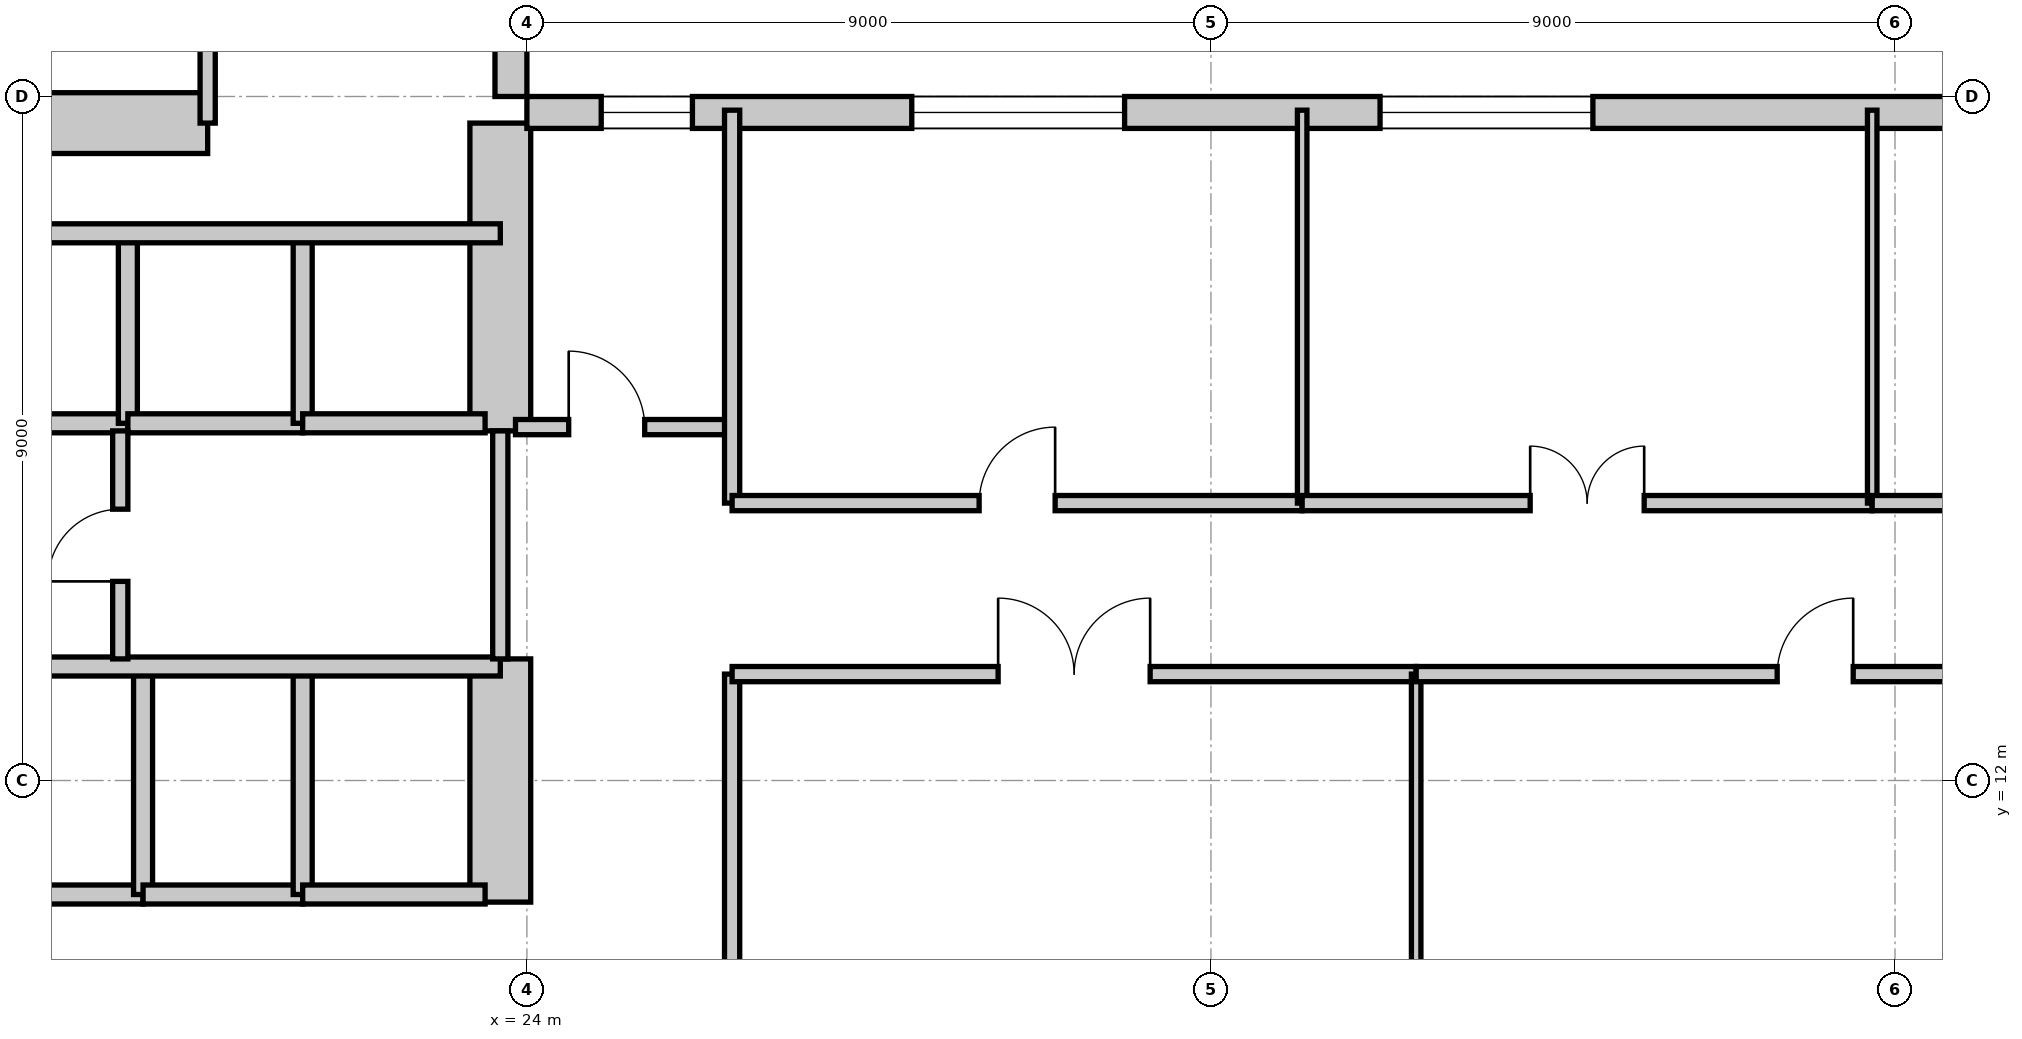
"""IFC4 building model, lengths in metres.
Left out: names, types, materials, properties, quantities, classifications, styles, units other than length and angle.
Written with IfcOpenShell. Run it as: python <this file> out.ifc"""

import sys

from ifc_helpers import new_model, si_unit, direction, frame, frame_2d, origin, origin_2d, place, context, subcontext, project, spatial, rectangle, extrude, element, fill, save


model = new_model("IFC4")
c1 = context("Model", 3, precision=1e-05, world=origin(), true_north=direction((0.0, 1.0)))
c2 = subcontext(c1, "Body", "Model", "MODEL_VIEW")
j1 = project(units=[si_unit("LENGTHUNIT", "METRE"), si_unit("PLANEANGLEUNIT", "RADIAN")], contexts=[c1])
p1 = place(None, origin())
s1 = spatial("IfcSite", under=j1, at=p1, CompositionType="ELEMENT")
p2 = place(p1, origin())
s2 = spatial("IfcBuilding", under=s1, at=p2, CompositionType="ELEMENT")
p3 = place(p2, frame((0.0, 0.0, 38.4)))
s3 = spatial("IfcBuildingStorey", under=s2, at=p3, CompositionType="ELEMENT", Elevation=38.4)
p4 = place(p3, frame((7.475, 20.65, 0.0), z_axis=(0.0, 0.0, 1.0), x_axis=(1.0, 0.0, 0.0)))
e1 = element("IfcWall", 1, at=p4, inside=s3, PredefinedType="SHEAR", context=c2, shape_type="SweptSolid", body=[
    extrude(rectangle(XDim=12.325, YDim=0.8, at=frame_2d((6.163, 0.0))), origin(), (0.0, 0.0, 1.0), 4.2),
])
p5 = place(p3, frame((23.65, 10.4, 0.0), z_axis=(0.0, 0.0, 1.0), x_axis=(0.0, 1.0, 0.0)))
e2 = element("IfcWall", 2, at=p5, inside=s3, PredefinedType="SHEAR", context=c2, shape_type="SweptSolid", body=[
    extrude(rectangle(XDim=3.2, YDim=0.8, at=frame_2d((1.6, 0.0))), origin(), (0.0, 0.0, 1.0), 4.2),
])
p6 = place(p3, frame((23.65, 16.6, 0.0), z_axis=(0.0, 0.0, 1.0), x_axis=(0.0, 1.0, 0.0)))
e3 = element("IfcWall", 3, at=p6, inside=s3, PredefinedType="SHEAR", context=c2, shape_type="SweptSolid", body=[
    extrude(rectangle(XDim=4.05, YDim=0.8, at=frame_2d((2.025, 0.0))), origin(), (0.0, 0.0, 1.0), 4.2),
])
for number, where, z_axis, x_axis in (
    (4, (24.0, 21.0, 0.0), (0.0, 0.0, 1.0), (1.0, 0.0, 0.0)),
    (5, (33.0, 21.0, 0.0), (0.0, 0.0, 1.0), (1.0, 0.0, 0.0)),
    (6, (42.0, 21.0, 0.0), (0.0, 0.0, 1.0), (1.0, 0.0, 0.0)),
):
    element("IfcColumn", number, at=place(p3, frame(where, z_axis=z_axis, x_axis=x_axis)), inside=s3, PredefinedType="COLUMN", context=c2, shape_type="SweptSolid", body=[
        extrude(rectangle(XDim=1.2, YDim=1.2, at=origin_2d()), origin(), (0.0, 0.0, 1.0), 4.2),
    ])
p7 = place(p3, frame((64.4, 20.79, 0.0), z_axis=(0.0, 0.0, 1.0), x_axis=(-1.0, 0.0, 0.0)))
e7 = element("IfcWall", 7, at=p7, inside=s3, PredefinedType="STANDARD", context=c2, shape_type="SweptSolid", body=[
    extrude(rectangle(XDim=40.4, YDim=0.42, at=frame_2d((20.2, 0.0))), origin(), (0.0, 0.0, 1.0), 3.98),
])
p8 = place(p7, frame((26.375, 0.0, 0.85)))
e8 = element("IfcOpeningElement", 8, at=p8, cuts=e7, PredefinedType="OPENING", context=c2, shape_type="SweptSolid", body=[
    extrude(rectangle(XDim=2.8, YDim=2.45, at=frame_2d((1.4, 1.225))), frame((0.0, 0.22, 0.0), z_axis=(0.0, -1.0, 0.0), x_axis=(1.0, 0.0, 0.0)), (0.0, 0.0, 1.0), 0.44),
])
p9 = place(p7, frame((38.222, 0.0, 0.85)))
e9 = element("IfcOpeningElement", 9, at=p9, cuts=e7, PredefinedType="OPENING", context=c2, shape_type="SweptSolid", body=[
    extrude(rectangle(XDim=1.2, YDim=2.45, at=frame_2d((0.6, 1.225))), frame((0.0, 0.22, 0.0), z_axis=(0.0, -1.0, 0.0), x_axis=(1.0, 0.0, 0.0)), (0.0, 0.0, 1.0), 0.44),
])
p10 = place(p7, frame((32.536, 0.0, 0.85)))
e10 = element("IfcOpeningElement", 10, at=p10, cuts=e7, PredefinedType="OPENING", context=c2, shape_type="SweptSolid", body=[
    extrude(rectangle(XDim=2.8, YDim=2.45, at=frame_2d((1.4, 1.225))), frame((0.0, 0.22, 0.0), z_axis=(0.0, -1.0, 0.0), x_axis=(1.0, 0.0, 0.0)), (0.0, 0.0, 1.0), 0.44),
])
p11 = place(p7, frame((17.386, 0.0, 0.85)))
e11 = element("IfcOpeningElement", 11, at=p11, cuts=e7, PredefinedType="OPENING", context=c2, shape_type="SweptSolid", body=[
    extrude(rectangle(XDim=2.8, YDim=2.45, at=frame_2d((1.4, 1.225))), frame((0.0, 0.22, 0.0), z_axis=(0.0, -1.0, 0.0), x_axis=(1.0, 0.0, 0.0)), (0.0, 0.0, 1.0), 0.44),
])
p12 = place(p3, frame((23.79, 21.0, 0.0), z_axis=(0.0, 0.0, 1.0), x_axis=(0.0, 1.0, 0.0)))
e12 = element("IfcWall", 12, at=p12, inside=s3, PredefinedType="STANDARD", context=c2, shape_type="SweptSolid", body=[
    extrude(rectangle(XDim=28.4, YDim=0.42, at=frame_2d((14.2, 0.0))), origin(), (0.0, 0.0, 1.0), 3.98),
])
p13 = place(p12, frame((10.433, 0.0, 0.85)))
e13 = element("IfcOpeningElement", 13, at=p13, cuts=e12, PredefinedType="OPENING", context=c2, shape_type="SweptSolid", body=[
    extrude(rectangle(XDim=2.8, YDim=2.45, at=frame_2d((1.4, 1.225))), frame((0.0, 0.22, 0.0), z_axis=(0.0, -1.0, 0.0), x_axis=(1.0, 0.0, 0.0)), (0.0, 0.0, 1.0), 0.44),
])
p14 = place(p12, frame((16.016, 0.0, 0.85)))
e14 = element("IfcOpeningElement", 14, at=p14, cuts=e12, PredefinedType="OPENING", context=c2, shape_type="SweptSolid", body=[
    extrude(rectangle(XDim=1.2, YDim=2.45, at=frame_2d((0.6, 1.225))), frame((0.0, 0.22, 0.0), z_axis=(0.0, -1.0, 0.0), x_axis=(1.0, 0.0, 0.0)), (0.0, 0.0, 1.0), 0.44),
])
p15 = place(p3, frame((16.45, 16.7, 0.0), z_axis=(0.0, 0.0, 1.0), x_axis=(1.0, 0.0, 0.0)))
e15 = element("IfcWall", 15, at=p15, inside=s3, PredefinedType="PARTITIONING", context=c2, shape_type="SweptSolid", body=[
    extrude(rectangle(XDim=2.3, YDim=0.25, at=frame_2d((1.15, 0.0))), origin(), (0.0, 0.0, 1.0), 3.426),
])
p16 = place(p3, frame((18.75, 16.7, 0.0), z_axis=(0.0, 0.0, 1.0), x_axis=(0.0, 1.0, 0.0)))
e16 = element("IfcWall", 16, at=p16, inside=s3, PredefinedType="PARTITIONING", context=c2, shape_type="SweptSolid", body=[
    extrude(rectangle(XDim=2.5, YDim=0.25, at=frame_2d((1.25, 0.0))), origin(), (0.0, 0.0, 1.0), 3.97),
])
p17 = place(p3, frame((18.75, 16.7, 0.0), z_axis=(0.0, 0.0, 1.0), x_axis=(1.0, 0.0, 0.0)))
e17 = element("IfcWall", 17, at=p17, inside=s3, PredefinedType="PARTITIONING", context=c2, shape_type="SweptSolid", body=[
    extrude(rectangle(XDim=2.3, YDim=0.25, at=frame_2d((1.15, 0.0))), origin(), (0.0, 0.0, 1.0), 3.426),
])
p18 = place(p3, frame((21.05, 16.7, 0.0), z_axis=(0.0, 0.0, 1.0), x_axis=(0.0, 1.0, 0.0)))
e18 = element("IfcWall", 18, at=p18, inside=s3, PredefinedType="PARTITIONING", context=c2, shape_type="SweptSolid", body=[
    extrude(rectangle(XDim=2.5, YDim=0.25, at=frame_2d((1.25, 0.0))), origin(), (0.0, 0.0, 1.0), 3.97),
])
p19 = place(p3, frame((21.05, 16.7, 0.0), z_axis=(0.0, 0.0, 1.0), x_axis=(1.0, 0.0, 0.0)))
e19 = element("IfcWall", 19, at=p19, inside=s3, PredefinedType="PARTITIONING", context=c2, shape_type="SweptSolid", body=[
    extrude(rectangle(XDim=2.4, YDim=0.25, at=frame_2d((1.2, 0.0))), origin(), (0.0, 0.0, 1.0), 3.426),
])
p20 = place(p3, frame((16.45, 19.2, 0.0), z_axis=(0.0, 0.0, 1.0), x_axis=(1.0, 0.0, 0.0)))
e20 = element("IfcWall", 20, at=p20, inside=s3, PredefinedType="PARTITIONING", context=c2, shape_type="SweptSolid", body=[
    extrude(rectangle(XDim=7.2, YDim=0.25, at=frame_2d((3.6, 0.0))), origin(), (0.0, 0.0, 1.0), 3.97),
])
p21 = place(p3, frame((16.85, 10.5, 0.0), z_axis=(0.0, 0.0, 1.0), x_axis=(1.0, 0.0, 0.0)))
e21 = element("IfcWall", 21, at=p21, inside=s3, PredefinedType="PARTITIONING", context=c2, shape_type="SweptSolid", body=[
    extrude(rectangle(XDim=2.1, YDim=0.25, at=frame_2d((1.05, 0.0))), origin(), (0.0, 0.0, 1.0), 3.426),
])
p22 = place(p3, frame((18.95, 10.5, 0.0), z_axis=(0.0, 0.0, 1.0), x_axis=(0.0, 1.0, 0.0)))
e22 = element("IfcWall", 22, at=p22, inside=s3, PredefinedType="PARTITIONING", context=c2, shape_type="SweptSolid", body=[
    extrude(rectangle(XDim=3.0, YDim=0.25, at=frame_2d((1.5, 0.0))), origin(), (0.0, 0.0, 1.0), 3.97),
])
p23 = place(p3, frame((18.95, 10.5, 0.0), z_axis=(0.0, 0.0, 1.0), x_axis=(1.0, 0.0, 0.0)))
e23 = element("IfcWall", 23, at=p23, inside=s3, PredefinedType="PARTITIONING", context=c2, shape_type="SweptSolid", body=[
    extrude(rectangle(XDim=2.1, YDim=0.25, at=frame_2d((1.05, 0.0))), origin(), (0.0, 0.0, 1.0), 3.426),
])
p24 = place(p3, frame((21.05, 10.5, 0.0), z_axis=(0.0, 0.0, 1.0), x_axis=(0.0, 1.0, 0.0)))
e24 = element("IfcWall", 24, at=p24, inside=s3, PredefinedType="PARTITIONING", context=c2, shape_type="SweptSolid", body=[
    extrude(rectangle(XDim=3.0, YDim=0.25, at=frame_2d((1.5, 0.0))), origin(), (0.0, 0.0, 1.0), 3.97),
])
p25 = place(p3, frame((21.05, 10.5, 0.0), z_axis=(0.0, 0.0, 1.0), x_axis=(1.0, 0.0, 0.0)))
e25 = element("IfcWall", 25, at=p25, inside=s3, PredefinedType="PARTITIONING", context=c2, shape_type="SweptSolid", body=[
    extrude(rectangle(XDim=2.4, YDim=0.25, at=frame_2d((1.2, 0.0))), origin(), (0.0, 0.0, 1.0), 3.426),
])
p26 = place(p3, frame((14.7, 13.5, 0.0), z_axis=(0.0, 0.0, 1.0), x_axis=(1.0, 0.0, 0.0)))
e26 = element("IfcWall", 26, at=p26, inside=s3, PredefinedType="PARTITIONING", context=c2, shape_type="SweptSolid", body=[
    extrude(rectangle(XDim=8.95, YDim=0.25, at=frame_2d((4.475, 0.0))), origin(), (0.0, 0.0, 1.0), 3.426),
])
p27 = place(p3, frame((18.65, 13.6, 0.0), z_axis=(0.0, 0.0, 1.0), x_axis=(0.0, 1.0, 0.0)))
e27 = element("IfcWall", 27, at=p27, inside=s3, PredefinedType="PARTITIONING", context=c2, shape_type="SweptSolid", body=[
    extrude(rectangle(XDim=3.0, YDim=0.2, at=frame_2d((1.5, 0.0))), origin(), (0.0, 0.0, 1.0), 3.97),
])
p28 = place(p27, frame((1.02, 0.0, 0.0)))
e28 = element("IfcOpeningElement", 28, at=p28, cuts=e27, PredefinedType="OPENING", context=c2, shape_type="SweptSolid", body=[
    extrude(rectangle(XDim=0.95, YDim=2.1, at=frame_2d((0.475, 1.05))), frame((0.0, 0.11, 0.0), z_axis=(0.0, -1.0, 0.0), x_axis=(1.0, 0.0, 0.0)), (0.0, 0.0, 1.0), 0.22),
])
p29 = place(p3, frame((23.65, 13.6, 0.0), z_axis=(0.0, 0.0, 1.0), x_axis=(0.0, 1.0, 0.0)))
e29 = element("IfcWall", 29, at=p29, inside=s3, PredefinedType="PARTITIONING", context=c2, shape_type="SweptSolid", body=[
    extrude(rectangle(XDim=3.0, YDim=0.2, at=frame_2d((1.5, 0.0))), origin(), (0.0, 0.0, 1.0), 3.97),
])
p30 = place(p3, frame((23.85, 16.65, 0.0), z_axis=(0.0, 0.0, 1.0), x_axis=(1.0, 0.0, 0.0)))
e30 = element("IfcWall", 30, at=p30, inside=s3, PredefinedType="PARTITIONING", context=c2, shape_type="SweptSolid", body=[
    extrude(rectangle(XDim=2.85, YDim=0.2, at=frame_2d((1.425, 0.0))), origin(), (0.0, 0.0, 1.0), 3.97),
])
p31 = place(p30, frame((0.7, 0.0, 0.0)))
e31 = element("IfcOpeningElement", 31, at=p31, cuts=e30, PredefinedType="OPENING", context=c2, shape_type="SweptSolid", body=[
    extrude(rectangle(XDim=1.0, YDim=2.15, at=frame_2d((0.5, 1.075))), frame((0.0, 0.11, 0.0), z_axis=(0.0, -1.0, 0.0), x_axis=(1.0, 0.0, 0.0)), (0.0, 0.0, 1.0), 0.22),
])
p32 = place(p3, frame((26.7, 3.18, 0.0), z_axis=(0.0, 0.0, 1.0), x_axis=(0.0, 1.0, 0.0)))
e32 = element("IfcWall", 32, at=p32, inside=s3, PredefinedType="PARTITIONING", context=c2, shape_type="SweptSolid", body=[
    extrude(rectangle(XDim=10.22, YDim=0.2, at=frame_2d((5.11, 0.0))), origin(), (0.0, 0.0, 1.0), 3.97),
])
p33 = place(p3, frame((26.7, 15.65, 0.0), z_axis=(0.0, 0.0, 1.0), x_axis=(0.0, 1.0, 0.0)))
e33 = element("IfcWall", 33, at=p33, inside=s3, PredefinedType="PARTITIONING", context=c2, shape_type="SweptSolid", body=[
    extrude(rectangle(XDim=5.17, YDim=0.2, at=frame_2d((2.585, 0.0))), origin(), (0.0, 0.0, 1.0), 3.97),
])
p34 = place(p3, frame((26.7, 13.4, 0.0), z_axis=(0.0, 0.0, 1.0), x_axis=(1.0, 0.0, 0.0)))
e34 = element("IfcWall", 34, at=p34, inside=s3, PredefinedType="PARTITIONING", context=c2, shape_type="SweptSolid", body=[
    extrude(rectangle(XDim=9.0, YDim=0.2, at=frame_2d((4.5, 0.0))), origin(), (0.0, 0.0, 1.0), 3.97),
])
p35 = place(p34, frame((3.5, 0.0, 0.0)))
e35 = element("IfcOpeningElement", 35, at=p35, cuts=e34, PredefinedType="OPENING", context=c2, shape_type="SweptSolid", body=[
    extrude(rectangle(XDim=2.0, YDim=2.5, at=frame_2d((1.0, 1.25))), frame((0.0, 0.11, 0.0), z_axis=(0.0, -1.0, 0.0), x_axis=(1.0, 0.0, 0.0)), (0.0, 0.0, 1.0), 0.22),
])
p36 = place(p3, frame((35.7, 3.18, 0.0), z_axis=(0.0, 0.0, 1.0), x_axis=(0.0, 1.0, 0.0)))
e36 = element("IfcWall", 36, at=p36, inside=s3, PredefinedType="PARTITIONING", context=c2, shape_type="SweptSolid", body=[
    extrude(rectangle(XDim=10.22, YDim=0.125, at=frame_2d((5.11, 0.0))), origin(), (0.0, 0.0, 1.0), 3.97),
])
p37 = place(p3, frame((35.7, 13.4, 0.0), z_axis=(0.0, 0.0, 1.0), x_axis=(1.0, 0.0, 0.0)))
e37 = element("IfcWall", 37, at=p37, inside=s3, PredefinedType="PARTITIONING", context=c2, shape_type="SweptSolid", body=[
    extrude(rectangle(XDim=10.5, YDim=0.2, at=frame_2d((5.25, 0.0))), origin(), (0.0, 0.0, 1.0), 3.97),
])
p38 = place(p37, frame((4.75, 0.0, 0.0)))
e38 = element("IfcOpeningElement", 38, at=p38, cuts=e37, PredefinedType="OPENING", context=c2, shape_type="SweptSolid", body=[
    extrude(rectangle(XDim=1.0, YDim=2.15, at=frame_2d((0.5, 1.075))), frame((0.0, 0.11, 0.0), z_axis=(0.0, -1.0, 0.0), x_axis=(1.0, 0.0, 0.0)), (0.0, 0.0, 1.0), 0.22),
])
p39 = place(p3, frame((26.7, 15.65, 0.0), z_axis=(0.0, 0.0, 1.0), x_axis=(1.0, 0.0, 0.0)))
e39 = element("IfcWall", 39, at=p39, inside=s3, PredefinedType="PARTITIONING", context=c2, shape_type="SweptSolid", body=[
    extrude(rectangle(XDim=7.5, YDim=0.2, at=frame_2d((3.75, 0.0))), origin(), (0.0, 0.0, 1.0), 3.97),
])
p40 = place(p39, frame((3.25, 0.0, 0.0)))
e40 = element("IfcOpeningElement", 40, at=p40, cuts=e39, PredefinedType="OPENING", context=c2, shape_type="SweptSolid", body=[
    extrude(rectangle(XDim=1.0, YDim=2.15, at=frame_2d((0.5, 1.075))), frame((0.0, 0.11, 0.0), z_axis=(0.0, -1.0, 0.0), x_axis=(1.0, 0.0, 0.0)), (0.0, 0.0, 1.0), 0.22),
])
p41 = place(p3, frame((34.2, 15.65, 0.0), z_axis=(0.0, 0.0, 1.0), x_axis=(0.0, 1.0, 0.0)))
e41 = element("IfcWall", 41, at=p41, inside=s3, PredefinedType="PARTITIONING", context=c2, shape_type="SweptSolid", body=[
    extrude(rectangle(XDim=5.17, YDim=0.125, at=frame_2d((2.585, 0.0))), origin(), (0.0, 0.0, 1.0), 3.97),
])
p42 = place(p3, frame((34.2, 15.65, 0.0), z_axis=(0.0, 0.0, 1.0), x_axis=(1.0, 0.0, 0.0)))
e42 = element("IfcWall", 42, at=p42, inside=s3, PredefinedType="PARTITIONING", context=c2, shape_type="SweptSolid", body=[
    extrude(rectangle(XDim=7.5, YDim=0.2, at=frame_2d((3.75, 0.0))), origin(), (0.0, 0.0, 1.0), 3.97),
])
p43 = place(p42, frame((3.0, 0.0, 0.0)))
e43 = element("IfcOpeningElement", 43, at=p43, cuts=e42, PredefinedType="OPENING", context=c2, shape_type="SweptSolid", body=[
    extrude(rectangle(XDim=1.5, YDim=2.3, at=frame_2d((0.75, 1.15))), frame((0.0, 0.11, 0.0), z_axis=(0.0, -1.0, 0.0), x_axis=(1.0, 0.0, 0.0)), (0.0, 0.0, 1.0), 0.22),
])
p44 = place(p3, frame((41.7, 15.65, 0.0), z_axis=(0.0, 0.0, 1.0), x_axis=(0.0, 1.0, 0.0)))
e44 = element("IfcWall", 44, at=p44, inside=s3, PredefinedType="PARTITIONING", context=c2, shape_type="SweptSolid", body=[
    extrude(rectangle(XDim=5.17, YDim=0.125, at=frame_2d((2.585, 0.0))), origin(), (0.0, 0.0, 1.0), 3.97),
])
p45 = place(p3, frame((41.7, 15.65, 0.0), z_axis=(0.0, 0.0, 1.0), x_axis=(1.0, 0.0, 0.0)))
e45 = element("IfcWall", 45, at=p45, inside=s3, PredefinedType="PARTITIONING", context=c2, shape_type="SweptSolid", body=[
    extrude(rectangle(XDim=18.3, YDim=0.2, at=frame_2d((9.15, 0.0))), origin(), (0.0, 0.0, 1.0), 3.97),
])
p46 = place(p45, frame((8.65, 0.0, 0.0)))
e46 = element("IfcOpeningElement", 46, at=p46, cuts=e45, PredefinedType="OPENING", context=c2, shape_type="SweptSolid", body=[
    extrude(rectangle(XDim=1.0, YDim=2.15, at=frame_2d((0.5, 1.075))), frame((0.0, 0.11, 0.0), z_axis=(0.0, -1.0, 0.0), x_axis=(1.0, 0.0, 0.0)), (0.0, 0.0, 1.0), 0.22),
])
p47 = place(p3, frame((19.8, 20.65, 0.0), z_axis=(0.0, 0.0, 1.0), x_axis=(0.0, 1.0, 0.0)))
e47 = element("IfcWall", 47, at=p47, inside=s3, PredefinedType="PARTITIONING", context=c2, shape_type="SweptSolid", body=[
    extrude(rectangle(XDim=6.15, YDim=0.2, at=frame_2d((3.075, 0.0))), origin(), (0.0, 0.0, 1.0), 3.97),
])
p48 = place(p8, origin())
e48 = element("IfcWindow", 48, at=p48, inside=s3, PartitioningType="SINGLE_PANEL", PredefinedType="WINDOW", context=c2, shape_type="SweptSolid", body=[
    extrude(rectangle(XDim=2.8, YDim=2.45, at=frame_2d((1.4, 1.225))), frame((0.0, 0.11, 0.0), z_axis=(0.0, -1.0, 0.0), x_axis=(1.0, 0.0, 0.0)), (0.0, 0.0, 1.0), 0.06),
])
fill(e8, e48)
p49 = place(p28, origin())
e49 = element("IfcDoor", 49, at=p49, inside=s3, OperationType="SINGLE_SWING_LEFT", PredefinedType="DOOR", context=c2, shape_type="SweptSolid", body=[
    extrude(rectangle(XDim=0.95, YDim=2.1, at=frame_2d((0.475, 1.05))), frame((0.0, 0.025, 0.0), z_axis=(0.0, -1.0, 0.0), x_axis=(1.0, 0.0, 0.0)), (0.0, 0.0, 1.0), 0.05),
])
fill(e28, e49)
p50 = place(p31, origin())
e50 = element("IfcDoor", 50, at=p50, inside=s3, OperationType="SINGLE_SWING_LEFT", PredefinedType="DOOR", context=c2, shape_type="SweptSolid", body=[
    extrude(rectangle(XDim=1.0, YDim=2.15, at=frame_2d((0.5, 1.075))), frame((0.0, 0.025, 0.0), z_axis=(0.0, -1.0, 0.0), x_axis=(1.0, 0.0, 0.0)), (0.0, 0.0, 1.0), 0.05),
])
fill(e31, e50)
p51 = place(p35, origin())
e51 = element("IfcDoor", 51, at=p51, inside=s3, OperationType="DOUBLE_DOOR_SINGLE_SWING", PredefinedType="DOOR", context=c2, shape_type="SweptSolid", body=[
    extrude(rectangle(XDim=2.0, YDim=2.5, at=frame_2d((1.0, 1.25))), frame((0.0, 0.025, 0.0), z_axis=(0.0, -1.0, 0.0), x_axis=(1.0, 0.0, 0.0)), (0.0, 0.0, 1.0), 0.05),
])
fill(e35, e51)
p52 = place(p38, origin())
e52 = element("IfcDoor", 52, at=p52, inside=s3, OperationType="SINGLE_SWING_RIGHT", PredefinedType="DOOR", context=c2, shape_type="SweptSolid", body=[
    extrude(rectangle(XDim=1.0, YDim=2.15, at=frame_2d((0.5, 1.075))), frame((0.0, 0.025, 0.0), z_axis=(0.0, -1.0, 0.0), x_axis=(1.0, 0.0, 0.0)), (0.0, 0.0, 1.0), 0.05),
])
fill(e38, e52)
p53 = place(p40, origin())
e53 = element("IfcDoor", 53, at=p53, inside=s3, OperationType="SINGLE_SWING_RIGHT", PredefinedType="DOOR", context=c2, shape_type="SweptSolid", body=[
    extrude(rectangle(XDim=1.0, YDim=2.15, at=frame_2d((0.5, 1.075))), frame((0.0, 0.025, 0.0), z_axis=(0.0, -1.0, 0.0), x_axis=(1.0, 0.0, 0.0)), (0.0, 0.0, 1.0), 0.05),
])
fill(e40, e53)
p54 = place(p43, origin())
e54 = element("IfcDoor", 54, at=p54, inside=s3, OperationType="DOUBLE_DOOR_SINGLE_SWING", PredefinedType="DOOR", context=c2, shape_type="SweptSolid", body=[
    extrude(rectangle(XDim=1.5, YDim=2.3, at=frame_2d((0.75, 1.15))), frame((0.0, 0.025, 0.0), z_axis=(0.0, -1.0, 0.0), x_axis=(1.0, 0.0, 0.0)), (0.0, 0.0, 1.0), 0.05),
])
fill(e43, e54)
p55 = place(p9, origin())
e55 = element("IfcWindow", 55, at=p55, inside=s3, PartitioningType="SINGLE_PANEL", PredefinedType="WINDOW", context=c2, shape_type="SweptSolid", body=[
    extrude(rectangle(XDim=1.2, YDim=2.45, at=frame_2d((0.6, 1.225))), frame((0.0, 0.11, 0.0), z_axis=(0.0, -1.0, 0.0), x_axis=(1.0, 0.0, 0.0)), (0.0, 0.0, 1.0), 0.06),
])
fill(e9, e55)
p56 = place(p10, origin())
e56 = element("IfcWindow", 56, at=p56, inside=s3, PartitioningType="SINGLE_PANEL", PredefinedType="WINDOW", context=c2, shape_type="SweptSolid", body=[
    extrude(rectangle(XDim=2.8, YDim=2.45, at=frame_2d((1.4, 1.225))), frame((0.0, 0.11, 0.0), z_axis=(0.0, -1.0, 0.0), x_axis=(1.0, 0.0, 0.0)), (0.0, 0.0, 1.0), 0.06),
])
fill(e10, e56)
save(model, sys.argv[1])
